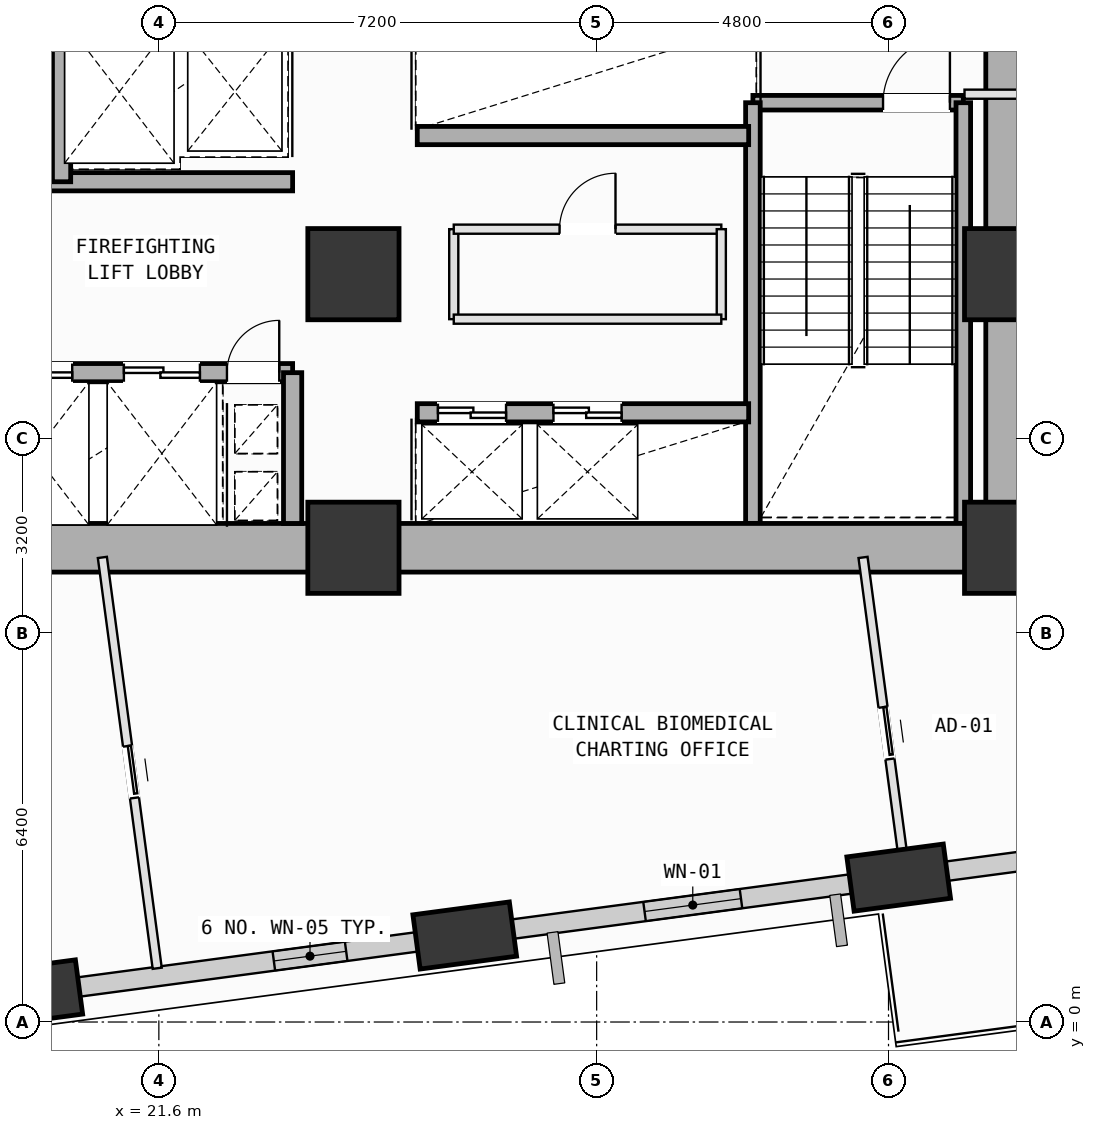
"""IFC4 building model, lengths in metres.
Left out: names, types, materials, properties, quantities, classifications, styles, units other than length and angle.
Written with IfcOpenShell. Run it as: python <this file> out.ifc"""

import sys

from ifc_helpers import new_model, si_unit, direction, frame, frame_2d, origin, origin_2d, place, context, subcontext, project, spatial, rectangle, extrude, element, fill, save


model = new_model("IFC4")
c1 = context("Model", 3, precision=1e-05, world=origin(), true_north=direction((0.0, 1.0)))
c2 = subcontext(c1, "Body", "Model", "MODEL_VIEW")
j1 = project(units=[si_unit("LENGTHUNIT", "METRE"), si_unit("PLANEANGLEUNIT", "RADIAN")], contexts=[c1])
p1 = place(None, origin())
s1 = spatial("IfcSite", under=j1, at=p1, CompositionType="ELEMENT")
p2 = place(p1, origin())
s2 = spatial("IfcBuilding", under=s1, at=p2, CompositionType="ELEMENT")
p3 = place(p2, frame((0.0, 0.0, 55.0)))
s3 = spatial("IfcBuildingStorey", under=s2, at=p3, CompositionType="ELEMENT", Elevation=55.0)
for number, where, z_axis, x_axis in (
    (1, (24.8, 7.8, 0.0), (0.0, 0.0, 1.0), (1.0, 0.0, 0.0)),
    (2, (24.8, 12.3, 0.0), (0.0, 0.0, 1.0), (1.0, 0.0, 0.0)),
    (3, (35.6, 7.8, 0.0), (0.0, 0.0, 1.0), (1.0, 0.0, 0.0)),
    (4, (35.6, 12.3, 0.0), (0.0, 0.0, 1.0), (1.0, 0.0, 0.0)),
):
    element("IfcColumn", number, at=place(p3, frame(where, z_axis=z_axis, x_axis=x_axis)), inside=s3, PredefinedType="COLUMN", context=c2, shape_type="SweptSolid", body=[
        extrude(rectangle(XDim=1.5, YDim=1.5, at=origin_2d()), origin(), (0.0, 0.0, 1.0), 4.0),
    ])
p4 = place(p3, frame((19.494, 0.47, 0.002), z_axis=(0.100662281342, -0.057217921221, 0.993273987682), x_axis=(0.375615177917, 0.926649194649, 0.015313659767)))
e5 = element("IfcColumn", 5, at=p4, inside=s3, PredefinedType="COLUMN", context=c2, shape_type="SweptSolid", body=[
    extrude(rectangle(XDim=1.6, YDim=0.9, at=origin_2d()), origin(), (0.0, 0.0, 1.0), 4.024),
])
p5 = place(p3, frame((26.631, 1.423, 0.002), z_axis=(0.096696373059, -0.027957468012, 0.994921198598), x_axis=(0.148903026173, 0.988762188651, 0.013312516319)))
e6 = element("IfcColumn", 6, at=p5, inside=s3, PredefinedType="COLUMN", context=c2, shape_type="SweptSolid", body=[
    extrude(rectangle(XDim=1.6, YDim=0.9, at=origin_2d()), origin(), (0.0, 0.0, 1.0), 4.017),
])
p6 = place(p3, frame((33.768, 2.375, 0.002), z_axis=(0.092515284398, 0.001459807249, 0.995710194341), x_axis=(-0.147311180333, 0.989014492108, 0.012237260689)))
e7 = element("IfcColumn", 7, at=p6, inside=s3, PredefinedType="COLUMN", context=c2, shape_type="SweptSolid", body=[
    extrude(rectangle(XDim=1.6, YDim=0.9, at=origin_2d()), origin(), (0.0, 0.0, 1.0), 4.014),
])
p7 = place(p3, frame((26.217, 1.368, 0.0), z_axis=(0.0, 0.0, 1.0), x_axis=(-0.991217601536, -0.132240940729, 0.0)))
e8 = element("IfcWall", 8, at=p7, inside=s3, PredefinedType="SOLIDWALL", context=c2, shape_type="SweptSolid", body=[
    extrude(rectangle(XDim=6.006, YDim=0.32, at=frame_2d((3.003, 0.0))), origin(), (0.0, 0.0, 1.0), 3.165),
])
p8 = place(p7, frame((1.55, 0.0, 0.75)))
e9 = element("IfcOpeningElement", 9, at=p8, cuts=e8, PredefinedType="OPENING", context=c2, shape_type="SweptSolid", body=[
    extrude(rectangle(XDim=1.2, YDim=1.75, at=frame_2d((0.6, 0.875))), frame((0.0, 0.17, 0.0), z_axis=(0.0, -1.0, 0.0), x_axis=(1.0, 0.0, 0.0)), (0.0, 0.0, 1.0), 0.34),
])
p9 = place(p3, frame((33.348, 2.319, 0.0), z_axis=(0.0, 0.0, 1.0), x_axis=(-0.991219354878, -0.132227797813, 0.0)))
e10 = element("IfcWall", 10, at=p9, inside=s3, PredefinedType="SOLIDWALL", context=c2, shape_type="SweptSolid", body=[
    extrude(rectangle(XDim=5.99, YDim=0.32, at=frame_2d((2.995, 0.0))), origin(), (0.0, 0.0, 1.0), 3.165),
])
p10 = place(p9, frame((2.194, 0.0, 0.75)))
e11 = element("IfcOpeningElement", 11, at=p10, cuts=e10, PredefinedType="OPENING", context=c2, shape_type="SweptSolid", body=[
    extrude(rectangle(XDim=1.6, YDim=1.95, at=frame_2d((0.8, 0.975))), frame((0.0, 0.17, 0.0), z_axis=(0.0, -1.0, 0.0), x_axis=(1.0, 0.0, 0.0)), (0.0, 0.0, 1.0), 0.34),
])
p11 = place(p3, frame((40.485, 3.271, 0.0), z_axis=(0.0, 0.0, 1.0), x_axis=(-0.991217209888, -0.132243876315, 0.0)))
e12 = element("IfcWall", 12, at=p11, inside=s3, PredefinedType="SOLIDWALL", context=c2, shape_type="SweptSolid", body=[
    extrude(rectangle(XDim=5.985, YDim=0.32, at=frame_2d((2.993, 0.0))), origin(), (0.0, 0.0, 1.0), 3.165),
])
p12 = place(p11, frame((1.993, 0.0, 0.75)))
e13 = element("IfcOpeningElement", 13, at=p12, cuts=e12, PredefinedType="OPENING", context=c2, shape_type="SweptSolid", body=[
    extrude(rectangle(XDim=2.0, YDim=1.95, at=frame_2d((1.0, 0.975))), frame((0.0, 0.17, 0.0), z_axis=(0.0, -1.0, 0.0), x_axis=(1.0, 0.0, 0.0)), (0.0, 0.0, 1.0), 0.34),
])
p13 = place(p3, frame((31.37, 15.12, 0.0), z_axis=(0.0, 0.0, 1.0), x_axis=(1.0, 0.0, 0.0)))
e14 = element("IfcWall", 14, at=p13, inside=s3, PredefinedType="SOLIDWALL", context=c2, shape_type="SweptSolid", body=[
    extrude(rectangle(XDim=3.46, YDim=0.24, at=frame_2d((1.73, 0.0))), origin(), (0.0, 0.0, 1.0), 3.78),
])
p14 = place(p13, frame((2.14, 0.0, 0.0)))
e15 = element("IfcOpeningElement", 15, at=p14, cuts=e14, PredefinedType="OPENING", context=c2, shape_type="SweptSolid", body=[
    extrude(rectangle(XDim=1.1, YDim=2.15, at=frame_2d((0.55, 1.075))), frame((0.0, 0.13, 0.0), z_axis=(0.0, -1.0, 0.0), x_axis=(1.0, 0.0, 0.0)), (0.0, 0.0, 1.0), 0.26),
])
for number, where, z_axis, x_axis in (
    (16, (34.83, 15.12, 0.0), (0.0, 0.0, 1.0), (0.0, -1.0, 0.0)),
    (17, (31.37, 8.2, 0.0), (0.0, 0.0, 1.0), (0.0, 1.0, 0.0)),
):
    element("IfcWall", number, at=place(p3, frame(where, z_axis=z_axis, x_axis=x_axis)), inside=s3, PredefinedType="SOLIDWALL", context=c2, shape_type="SweptSolid", body=[
        extrude(rectangle(XDim=6.92, YDim=0.24, at=frame_2d((3.46, 0.0))), origin(), (0.0, 0.0, 1.0), 3.78),
    ])
for number, where, z_axis, x_axis in (
    (18, (14.0, 7.8, 0.0), (0.0, 0.0, 1.0), (1.0, 0.0, 0.0)),
    (19, (24.8, 7.8, 0.0), (0.0, 0.0, 1.0), (1.0, 0.0, 0.0)),
):
    element("IfcWall", number, at=place(p3, frame(where, z_axis=z_axis, x_axis=x_axis)), inside=s3, PredefinedType="SHEAR", context=c2, shape_type="SweptSolid", body=[
        extrude(rectangle(XDim=10.8, YDim=0.8, at=frame_2d((5.4, 0.0))), origin(), (0.0, 0.0, 1.0), 3.78),
    ])
p15 = place(p3, frame((35.6, 7.8, 0.0), z_axis=(0.0, 0.0, 1.0), x_axis=(0.0, 1.0, 0.0)))
e20 = element("IfcWall", 20, at=p15, inside=s3, PredefinedType="SHEAR", context=c2, shape_type="SweptSolid", body=[
    extrude(rectangle(XDim=9.0, YDim=0.8, at=frame_2d((4.5, 0.0))), origin(), (0.0, 0.0, 1.0), 3.78),
])
p16 = place(p3, frame((18.5, 10.68, 0.0), z_axis=(0.0, 0.0, 1.0), x_axis=(1.0, 0.0, 0.0)))
e21 = element("IfcWall", 21, at=p16, inside=s3, PredefinedType="SOLIDWALL", context=c2, shape_type="SweptSolid", body=[
    extrude(rectangle(XDim=5.3, YDim=0.3, at=frame_2d((2.65, 0.0))), origin(), (0.0, 0.0, 1.0), 3.78),
])
p17 = place(p16, frame((4.22, 0.0, 0.0)))
e22 = element("IfcOpeningElement", 22, at=p17, cuts=e21, PredefinedType="OPENING", context=c2, shape_type="SweptSolid", body=[
    extrude(rectangle(XDim=0.86, YDim=2.06, at=frame_2d((0.43, 1.03))), frame((0.0, 0.16, 0.0), z_axis=(0.0, -1.0, 0.0), x_axis=(1.0, 0.0, 0.0)), (0.0, 0.0, 1.0), 0.32),
])
p18 = place(p16, frame((0.425, 0.0, 0.0)))
e23 = element("IfcOpeningElement", 23, at=p18, cuts=e21, PredefinedType="OPENING", context=c2, shape_type="SweptSolid", body=[
    extrude(rectangle(XDim=1.25, YDim=2.18, at=frame_2d((0.625, 1.09))), frame((0.0, 0.16, 0.0), z_axis=(0.0, -1.0, 0.0), x_axis=(1.0, 0.0, 0.0)), (0.0, 0.0, 1.0), 0.32),
])
p19 = place(p16, frame((2.525, 0.0, 0.0)))
e24 = element("IfcOpeningElement", 24, at=p19, cuts=e21, PredefinedType="OPENING", context=c2, shape_type="SweptSolid", body=[
    extrude(rectangle(XDim=1.25, YDim=2.18, at=frame_2d((0.625, 1.09))), frame((0.0, 0.16, 0.0), z_axis=(0.0, -1.0, 0.0), x_axis=(1.0, 0.0, 0.0)), (0.0, 0.0, 1.0), 0.32),
])
p20 = place(p3, frame((18.5, 13.82, 0.0), z_axis=(0.0, 0.0, 1.0), x_axis=(1.0, 0.0, 0.0)))
e25 = element("IfcWall", 25, at=p20, inside=s3, PredefinedType="SOLIDWALL", context=c2, shape_type="SweptSolid", body=[
    extrude(rectangle(XDim=5.3, YDim=0.3, at=frame_2d((2.65, 0.0))), origin(), (0.0, 0.0, 1.0), 3.78),
])
p21 = place(p20, frame((0.18, 0.0, 0.0)))
e26 = element("IfcOpeningElement", 26, at=p21, cuts=e25, PredefinedType="OPENING", context=c2, shape_type="SweptSolid", body=[
    extrude(rectangle(XDim=1.1, YDim=2.15, at=frame_2d((0.55, 1.075))), frame((0.0, 0.16, 0.0), z_axis=(0.0, -1.0, 0.0), x_axis=(1.0, 0.0, 0.0)), (0.0, 0.0, 1.0), 0.32),
])
p22 = place(p3, frame((23.8, 8.2, 0.0), z_axis=(0.0, 0.0, 1.0), x_axis=(0.0, 1.0, 0.0)))
e27 = element("IfcWall", 27, at=p22, inside=s3, PredefinedType="SOLIDWALL", context=c2, shape_type="SweptSolid", body=[
    extrude(rectangle(XDim=2.48, YDim=0.3, at=frame_2d((1.24, 0.0))), origin(), (0.0, 0.0, 1.0), 3.78),
])
p23 = place(p3, frame((20.0, 13.82, 0.0), z_axis=(0.0, 0.0, 1.0), x_axis=(0.0, 1.0, 0.0)))
e28 = element("IfcWall", 28, at=p23, inside=s3, PredefinedType="SOLIDWALL", context=c2, shape_type="SweptSolid", body=[
    extrude(rectangle(XDim=2.73, YDim=0.3, at=frame_2d((1.365, 0.0))), origin(), (0.0, 0.0, 1.0), 3.78),
])
p24 = place(p3, frame((25.85, 10.02, 0.0), z_axis=(0.0, 0.0, 1.0), x_axis=(1.0, 0.0, 0.0)))
e29 = element("IfcWall", 29, at=p24, inside=s3, PredefinedType="SOLIDWALL", context=c2, shape_type="SweptSolid", body=[
    extrude(rectangle(XDim=5.45, YDim=0.3, at=frame_2d((2.725, 0.0))), origin(), (0.0, 0.0, 1.0), 3.78),
])
p25 = place(p24, frame((0.34, 0.0, 0.0)))
e30 = element("IfcOpeningElement", 30, at=p25, cuts=e29, PredefinedType="OPENING", context=c2, shape_type="SweptSolid", body=[
    extrude(rectangle(XDim=1.12, YDim=2.15, at=frame_2d((0.56, 1.075))), frame((0.0, 0.16, 0.0), z_axis=(0.0, -1.0, 0.0), x_axis=(1.0, 0.0, 0.0)), (0.0, 0.0, 1.0), 0.32),
])
p26 = place(p24, frame((2.24, 0.0, 0.0)))
e31 = element("IfcOpeningElement", 31, at=p26, cuts=e29, PredefinedType="OPENING", context=c2, shape_type="SweptSolid", body=[
    extrude(rectangle(XDim=1.12, YDim=2.15, at=frame_2d((0.56, 1.075))), frame((0.0, 0.16, 0.0), z_axis=(0.0, -1.0, 0.0), x_axis=(1.0, 0.0, 0.0)), (0.0, 0.0, 1.0), 0.32),
])
p27 = place(p3, frame((25.85, 14.58, 0.0), z_axis=(0.0, 0.0, 1.0), x_axis=(1.0, 0.0, 0.0)))
e32 = element("IfcWall", 32, at=p27, inside=s3, PredefinedType="SOLIDWALL", context=c2, shape_type="SweptSolid", body=[
    extrude(rectangle(XDim=5.45, YDim=0.3, at=frame_2d((2.725, 0.0))), origin(), (0.0, 0.0, 1.0), 3.78),
])
p28 = place(p3, frame((26.45, 11.56, 0.0), z_axis=(0.0, 0.0, 1.0), x_axis=(0.0, 1.0, 0.0)))
e33 = element("IfcWall", 33, at=p28, inside=s3, PredefinedType="PARTITIONING", context=c2, shape_type="SweptSolid", body=[
    extrude(rectangle(XDim=1.48, YDim=0.15, at=frame_2d((0.74, 0.0))), origin(), (0.0, 0.0, 1.0), 3.78),
])
p29 = place(p3, frame((26.45, 13.04, 0.0), z_axis=(0.0, 0.0, 1.0), x_axis=(1.0, 0.0, 0.0)))
e34 = element("IfcWall", 34, at=p29, inside=s3, PredefinedType="PARTITIONING", context=c2, shape_type="SweptSolid", body=[
    extrude(rectangle(XDim=4.4, YDim=0.15, at=frame_2d((2.2, 0.0))), origin(), (0.0, 0.0, 1.0), 3.78),
])
p30 = place(p29, frame((1.74, 0.0, 0.0)))
e35 = element("IfcOpeningElement", 35, at=p30, cuts=e34, PredefinedType="OPENING", context=c2, shape_type="SweptSolid", body=[
    extrude(rectangle(XDim=0.92, YDim=2.1, at=frame_2d((0.46, 1.05))), frame((0.0, 0.085, 0.0), z_axis=(0.0, -1.0, 0.0), x_axis=(1.0, 0.0, 0.0)), (0.0, 0.0, 1.0), 0.17),
])
p31 = place(p3, frame((30.85, 13.04, 0.0), z_axis=(0.0, 0.0, 1.0), x_axis=(0.0, -1.0, 0.0)))
e36 = element("IfcWall", 36, at=p31, inside=s3, PredefinedType="PARTITIONING", context=c2, shape_type="SweptSolid", body=[
    extrude(rectangle(XDim=1.48, YDim=0.15, at=frame_2d((0.74, 0.0))), origin(), (0.0, 0.0, 1.0), 3.78),
])
p32 = place(p3, frame((30.85, 11.56, 0.0), z_axis=(0.0, 0.0, 1.0), x_axis=(-1.0, 0.0, 0.0)))
e37 = element("IfcWall", 37, at=p32, inside=s3, PredefinedType="PARTITIONING", context=c2, shape_type="SweptSolid", body=[
    extrude(rectangle(XDim=4.4, YDim=0.15, at=frame_2d((2.2, 0.0))), origin(), (0.0, 0.0, 1.0), 3.78),
])
p33 = place(p3, frame((20.671, 7.641, 0.0), z_axis=(0.0, 0.0, 1.0), x_axis=(0.132330273693, -0.991205679294, 0.0)))
e38 = element("IfcWall", 38, at=p33, inside=s3, PredefinedType="PARTITIONING", context=c2, shape_type="SweptSolid", body=[
    extrude(rectangle(XDim=6.817, YDim=0.15, at=frame_2d((3.409, 0.0))), origin(), (0.0, 0.0, 1.0), 3.78),
])
p34 = place(p33, frame((3.13, 0.0, 0.0)))
e39 = element("IfcOpeningElement", 39, at=p34, cuts=e38, PredefinedType="OPENING", context=c2, shape_type="SweptSolid", body=[
    extrude(rectangle(XDim=0.86, YDim=2.06, at=frame_2d((0.43, 1.03))), frame((0.0, 0.085, 0.0), z_axis=(0.0, -1.0, 0.0), x_axis=(1.0, 0.0, 0.0)), (0.0, 0.0, 1.0), 0.17),
])
p35 = place(p3, frame((20.294, 0.345, 0.0), z_axis=(0.0, 0.0, 1.0), x_axis=(-0.991254933816, -0.131960813064, 0.0)))
e40 = element("IfcWall", 40, at=p35, inside=s3, PredefinedType="PARTITIONING", context=c2, shape_type="SweptSolid", body=[
    extrude(rectangle(XDim=1.182, YDim=0.15, at=frame_2d((0.591, 0.0))), origin(), (0.0, 0.0, 1.0), 3.165),
])
p36 = place(p3, frame((33.912, 2.162, 0.0), z_axis=(0.0, 0.0, 1.0), x_axis=(-0.991239788313, -0.132074532234, 0.0)))
e41 = element("IfcWall", 41, at=p36, inside=s3, PredefinedType="PARTITIONING", context=c2, shape_type="SweptSolid", body=[
    extrude(rectangle(XDim=0.538, YDim=0.15, at=frame_2d((0.269, 0.0))), origin(), (0.0, 0.0, 1.0), 3.165),
])
p37 = place(p3, frame((27.442, 1.299, 0.0), z_axis=(0.0, 0.0, 1.0), x_axis=(-0.991242046428, -0.132057583627, 0.0)))
e42 = element("IfcWall", 42, at=p37, inside=s3, PredefinedType="PARTITIONING", context=c2, shape_type="SweptSolid", body=[
    extrude(rectangle(XDim=1.205, YDim=0.15, at=frame_2d((0.603, 0.0))), origin(), (0.0, 0.0, 1.0), 3.165),
])
p38 = place(p3, frame((33.181, 7.641, 0.0), z_axis=(0.0, 0.0, 1.0), x_axis=(0.132282335523, -0.991212078068, 0.0)))
e43 = element("IfcWall", 43, at=p38, inside=s3, PredefinedType="PARTITIONING", context=c2, shape_type="SweptSolid", body=[
    extrude(rectangle(XDim=5.528, YDim=0.15, at=frame_2d((2.764, 0.0))), origin(), (0.0, 0.0, 1.0), 3.78),
])
p39 = place(p38, frame((2.485, 0.0, 0.0)))
e44 = element("IfcOpeningElement", 44, at=p39, cuts=e43, PredefinedType="OPENING", context=c2, shape_type="SweptSolid", body=[
    extrude(rectangle(XDim=0.86, YDim=2.06, at=frame_2d((0.43, 1.03))), frame((0.0, 0.085, 0.0), z_axis=(0.0, -1.0, 0.0), x_axis=(1.0, 0.0, 0.0)), (0.0, 0.0, 1.0), 0.17),
])
p40 = place(p3, frame((35.6, 7.5, 0.0), z_axis=(0.0, 0.0, 1.0), x_axis=(1.0, 0.0, 0.0)))
e45 = element("IfcWall", 45, at=p40, inside=s3, PredefinedType="PARTITIONING", context=c2, shape_type="SweptSolid", body=[
    extrude(rectangle(XDim=0.55, YDim=0.15, at=frame_2d((0.275, 0.0))), origin(), (0.0, 0.0, 1.0), 3.78),
])
p41 = place(p3, frame((36.15, 15.26, 0.0), z_axis=(0.0, 0.0, 1.0), x_axis=(-1.0, 0.0, 0.0)))
e46 = element("IfcWall", 46, at=p41, inside=s3, PredefinedType="PARTITIONING", context=c2, shape_type="SweptSolid", body=[
    extrude(rectangle(XDim=1.3, YDim=0.15, at=frame_2d((0.65, 0.0))), origin(), (0.0, 0.0, 1.0), 3.78),
])
p42 = place(p3, frame((34.583, 2.252, 0.0), z_axis=(0.0, 0.0, 1.0), x_axis=(-0.991359278326, -0.131174621311, 0.0)))
e47 = element("IfcWall", 47, at=p42, inside=s3, PredefinedType="PARTITIONING", context=c2, shape_type="SweptSolid", body=[
    extrude(rectangle(XDim=0.517, YDim=0.15, at=frame_2d((0.259, 0.0))), origin(), (0.0, 0.0, 1.0), 3.165),
])
p43 = place(p8, origin())
e48 = element("IfcWindow", 48, at=p43, inside=s3, PartitioningType="SINGLE_PANEL", PredefinedType="WINDOW", context=c2, shape_type="SweptSolid", body=[
    extrude(rectangle(XDim=1.2, YDim=1.75, at=frame_2d((0.6, 0.875))), frame((0.0, 0.03, 0.0), z_axis=(0.0, -1.0, 0.0), x_axis=(1.0, 0.0, 0.0)), (0.0, 0.0, 1.0), 0.06),
])
fill(e9, e48)
p44 = place(p10, origin())
e49 = element("IfcWindow", 49, at=p44, inside=s3, PartitioningType="SINGLE_PANEL", PredefinedType="WINDOW", context=c2, shape_type="SweptSolid", body=[
    extrude(rectangle(XDim=1.6, YDim=1.95, at=frame_2d((0.8, 0.975))), frame((0.0, 0.03, 0.0), z_axis=(0.0, -1.0, 0.0), x_axis=(1.0, 0.0, 0.0)), (0.0, 0.0, 1.0), 0.06),
])
fill(e11, e49)
p45 = place(p14, origin())
e50 = element("IfcDoor", 50, at=p45, inside=s3, OperationType="SINGLE_SWING_RIGHT", PredefinedType="DOOR", context=c2, shape_type="SweptSolid", body=[
    extrude(rectangle(XDim=1.1, YDim=2.15, at=frame_2d((0.55, 1.075))), frame((0.0, 0.025, 0.0), z_axis=(0.0, -1.0, 0.0), x_axis=(1.0, 0.0, 0.0)), (0.0, 0.0, 1.0), 0.05),
])
fill(e15, e50)
p46 = place(p17, origin())
e51 = element("IfcDoor", 51, at=p46, inside=s3, OperationType="SINGLE_SWING_RIGHT", PredefinedType="DOOR", context=c2, shape_type="SweptSolid", body=[
    extrude(rectangle(XDim=0.86, YDim=2.06, at=frame_2d((0.43, 1.03))), frame((0.0, 0.025, 0.0), z_axis=(0.0, -1.0, 0.0), x_axis=(1.0, 0.0, 0.0)), (0.0, 0.0, 1.0), 0.05),
])
fill(e22, e51)
p47 = place(p18, origin())
e52 = element("IfcDoor", 52, at=p47, inside=s3, OperationType="DOUBLE_DOOR_SLIDING", PredefinedType="DOOR", context=c2, shape_type="SweptSolid", body=[
    extrude(rectangle(XDim=1.25, YDim=2.18, at=frame_2d((0.625, 1.09))), frame((0.0, 0.025, 0.0), z_axis=(0.0, -1.0, 0.0), x_axis=(1.0, 0.0, 0.0)), (0.0, 0.0, 1.0), 0.05),
])
fill(e23, e52)
p48 = place(p19, origin())
e53 = element("IfcDoor", 53, at=p48, inside=s3, OperationType="DOUBLE_DOOR_SLIDING", PredefinedType="DOOR", context=c2, shape_type="SweptSolid", body=[
    extrude(rectangle(XDim=1.25, YDim=2.18, at=frame_2d((0.625, 1.09))), frame((0.0, 0.025, 0.0), z_axis=(0.0, -1.0, 0.0), x_axis=(1.0, 0.0, 0.0)), (0.0, 0.0, 1.0), 0.05),
])
fill(e24, e53)
p49 = place(p25, origin())
e54 = element("IfcDoor", 54, at=p49, inside=s3, OperationType="DOUBLE_DOOR_SLIDING", PredefinedType="DOOR", context=c2, shape_type="SweptSolid", body=[
    extrude(rectangle(XDim=1.12, YDim=2.15, at=frame_2d((0.56, 1.075))), frame((0.0, 0.025, 0.0), z_axis=(0.0, -1.0, 0.0), x_axis=(1.0, 0.0, 0.0)), (0.0, 0.0, 1.0), 0.05),
])
fill(e30, e54)
p50 = place(p26, origin())
e55 = element("IfcDoor", 55, at=p50, inside=s3, OperationType="DOUBLE_DOOR_SLIDING", PredefinedType="DOOR", context=c2, shape_type="SweptSolid", body=[
    extrude(rectangle(XDim=1.12, YDim=2.15, at=frame_2d((0.56, 1.075))), frame((0.0, 0.025, 0.0), z_axis=(0.0, -1.0, 0.0), x_axis=(1.0, 0.0, 0.0)), (0.0, 0.0, 1.0), 0.05),
])
fill(e31, e55)
p51 = place(p30, origin())
e56 = element("IfcDoor", 56, at=p51, inside=s3, OperationType="SINGLE_SWING_RIGHT", PredefinedType="DOOR", context=c2, shape_type="SweptSolid", body=[
    extrude(rectangle(XDim=0.92, YDim=2.1, at=frame_2d((0.46, 1.05))), frame((0.0, 0.025, 0.0), z_axis=(0.0, -1.0, 0.0), x_axis=(1.0, 0.0, 0.0)), (0.0, 0.0, 1.0), 0.05),
])
fill(e35, e56)
p52 = place(p39, origin())
e57 = element("IfcDoor", 57, at=p52, inside=s3, OperationType="SLIDING_TO_LEFT", PredefinedType="DOOR", context=c2, shape_type="SweptSolid", body=[
    extrude(rectangle(XDim=0.86, YDim=2.06, at=frame_2d((0.43, 1.03))), frame((0.0, 0.025, 0.0), z_axis=(0.0, -1.0, 0.0), x_axis=(1.0, 0.0, 0.0)), (0.0, 0.0, 1.0), 0.05),
])
fill(e44, e57)
p53 = place(p34, origin())
e58 = element("IfcDoor", 58, at=p53, inside=s3, OperationType="SLIDING_TO_LEFT", PredefinedType="DOOR", context=c2, shape_type="SweptSolid", body=[
    extrude(rectangle(XDim=0.86, YDim=2.06, at=frame_2d((0.43, 1.03))), frame((0.0, 0.025, 0.0), z_axis=(0.0, -1.0, 0.0), x_axis=(1.0, 0.0, 0.0)), (0.0, 0.0, 1.0), 0.05),
])
fill(e39, e58)
save(model, sys.argv[1])
